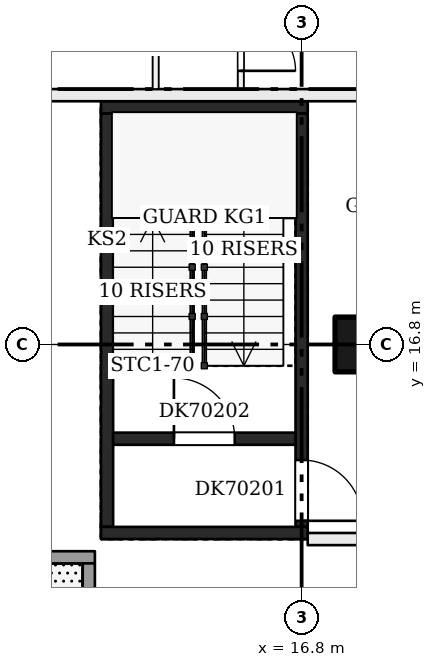
"""IFC4 building model, lengths in metres.
Left out: names, types, materials, properties, quantities, classifications, styles, units other than length and angle.
Written with IfcOpenShell. Run it as: python <this file> out.ifc"""

import sys

from ifc_helpers import new_model, si_unit, direction, frame, frame_2d, origin, origin_2d, place, context, subcontext, project, spatial, rectangle, extrude, element, fill, save


model = new_model("IFC4")
c1 = context("Model", 3, precision=1e-05, world=origin(), true_north=direction((0.0, 1.0)))
c2 = subcontext(c1, "Body", "Model", "MODEL_VIEW")
j1 = project(units=[si_unit("LENGTHUNIT", "METRE"), si_unit("PLANEANGLEUNIT", "RADIAN")], contexts=[c1])
p1 = place(None, origin())
s1 = spatial("IfcSite", under=j1, at=p1, CompositionType="ELEMENT")
p2 = place(p1, origin())
s2 = spatial("IfcBuilding", under=s1, at=p2, CompositionType="ELEMENT")
p3 = place(p2, frame((0.0, 0.0, 266.7)))
s3 = spatial("IfcBuildingStorey", under=s2, at=p3, CompositionType="ELEMENT", Elevation=266.7)
p4 = place(p3, frame((17.8, 16.8, 0.0), z_axis=(0.0, 0.0, 1.0), x_axis=(1.0, 0.0, 0.0)))
e1 = element("IfcColumn", 1, at=p4, inside=s3, PredefinedType="COLUMN", context=c2, shape_type="SweptSolid", body=[
    extrude(rectangle(XDim=0.9, YDim=0.9, at=origin_2d()), origin(), (0.0, 0.0, 1.0), 3.22),
])
p5 = place(p3, frame((13.6, 13.8, 0.0), z_axis=(0.0, 0.0, 1.0), x_axis=(0.0, 1.0, 0.0)))
e2 = element("IfcWall", 2, at=p5, inside=s3, PredefinedType="SHEAR", context=c2, shape_type="SweptSolid", body=[
    extrude(rectangle(XDim=6.8, YDim=0.2, at=frame_2d((3.4, 0.0))), origin(), (0.0, 0.0, 1.0), 3.22),
])
p6 = place(p3, frame((16.8, 13.8, 0.0), z_axis=(0.0, 0.0, 1.0), x_axis=(0.0, 1.0, 0.0)))
e3 = element("IfcWall", 3, at=p6, inside=s3, PredefinedType="SHEAR", context=c2, shape_type="SweptSolid", body=[
    extrude(rectangle(XDim=6.8, YDim=0.2, at=frame_2d((3.4, 0.0))), origin(), (0.0, 0.0, 1.0), 3.22),
])
p7 = place(p6, frame((0.1, 0.0, 0.0)))
e4 = element("IfcOpeningElement", 4, at=p7, cuts=e3, PredefinedType="OPENING", context=c2, shape_type="SweptSolid", body=[
    extrude(rectangle(XDim=1.0, YDim=2.1, at=frame_2d((0.5, 1.05))), frame((0.0, 0.11, 0.0), z_axis=(0.0, -1.0, 0.0), x_axis=(1.0, 0.0, 0.0)), (0.0, 0.0, 1.0), 0.22),
])
for number, where, z_axis, x_axis in (
    (5, (13.5, 13.7, 0.0), (0.0, 0.0, 1.0), (1.0, 0.0, 0.0)),
    (6, (13.5, 20.7, 0.0), (0.0, 0.0, 1.0), (1.0, 0.0, 0.0)),
):
    element("IfcWall", number, at=place(p3, frame(where, z_axis=z_axis, x_axis=x_axis)), inside=s3, PredefinedType="SHEAR", context=c2, shape_type="SweptSolid", body=[
        extrude(rectangle(XDim=3.4, YDim=0.2, at=frame_2d((1.7, 0.0))), origin(), (0.0, 0.0, 1.0), 3.22),
    ])
p8 = place(p3, frame((13.7, 15.25, 0.0), z_axis=(0.0, 0.0, 1.0), x_axis=(1.0, 0.0, 0.0)))
e7 = element("IfcWall", 7, at=p8, inside=s3, PredefinedType="SHEAR", context=c2, shape_type="SweptSolid", body=[
    extrude(rectangle(XDim=3.0, YDim=0.2, at=frame_2d((1.5, 0.0))), origin(), (0.0, 0.0, 1.0), 3.22),
])
p9 = place(p8, frame((1.0, 0.0, 0.0)))
e8 = element("IfcOpeningElement", 8, at=p9, cuts=e7, PredefinedType="OPENING", context=c2, shape_type="SweptSolid", body=[
    extrude(rectangle(XDim=1.0, YDim=2.1, at=frame_2d((0.5, 1.05))), frame((0.0, 0.11, 0.0), z_axis=(0.0, -1.0, 0.0), x_axis=(1.0, 0.0, 0.0)), (0.0, 0.0, 1.0), 0.22),
])
p10 = place(p3, frame((16.9, 13.6, 0.0), z_axis=(0.0, 0.0, 1.0), x_axis=(1.0, 0.0, 0.0)))
e9 = element("IfcWall", 9, at=p10, inside=s3, PredefinedType="PARTITIONING", context=c2, shape_type="SweptSolid", body=[
    extrude(rectangle(XDim=4.2, YDim=0.2, at=frame_2d((2.1, 0.0))), origin(), (0.0, 0.0, 1.0), 3.22),
])
p11 = place(p10, frame((1.6, 0.0, 0.0)))
e10 = element("IfcOpeningElement", 10, at=p11, cuts=e9, PredefinedType="OPENING", context=c2, shape_type="SweptSolid", body=[
    extrude(rectangle(XDim=1.0, YDim=2.1, at=frame_2d((0.5, 1.05))), frame((0.0, 0.11, 0.0), z_axis=(0.0, -1.0, 0.0), x_axis=(1.0, 0.0, 0.0)), (0.0, 0.0, 1.0), 0.22),
])
p12 = place(p3, frame((10.9, 20.9, 0.0), z_axis=(0.0, 0.0, 1.0), x_axis=(1.0, 0.0, 0.0)))
e11 = element("IfcWall", 11, at=p12, inside=s3, PredefinedType="PARTITIONING", context=c2, shape_type="SweptSolid", body=[
    extrude(rectangle(XDim=8.3, YDim=0.2, at=frame_2d((4.15, 0.0))), origin(), (0.0, 0.0, 1.0), 3.22),
])
p13 = place(p3, frame((14.4, 21.0, 0.0), z_axis=(0.0, 0.0, 1.0), x_axis=(0.0, 1.0, 0.0)))
e12 = element("IfcWall", 12, at=p13, inside=s3, PredefinedType="PARTITIONING", context=c2, shape_type="SweptSolid", body=[
    extrude(rectangle(XDim=19.0, YDim=0.1, at=frame_2d((9.5, 0.0))), origin(), (0.0, 0.0, 1.0), 3.22),
])
p14 = place(p13, frame((1.6, 0.0, 0.0)))
e13 = element("IfcOpeningElement", 13, at=p14, cuts=e12, PredefinedType="OPENING", context=c2, shape_type="SweptSolid", body=[
    extrude(rectangle(XDim=0.9, YDim=2.1, at=frame_2d((0.45, 1.05))), frame((0.0, 0.06, 0.0), z_axis=(0.0, -1.0, 0.0), x_axis=(1.0, 0.0, 0.0)), (0.0, 0.0, 1.0), 0.12),
])
p15 = place(p13, frame((5.8, 0.0, 0.0)))
e14 = element("IfcOpeningElement", 14, at=p15, cuts=e12, PredefinedType="OPENING", context=c2, shape_type="SweptSolid", body=[
    extrude(rectangle(XDim=0.9, YDim=2.1, at=frame_2d((0.45, 1.05))), frame((0.0, 0.06, 0.0), z_axis=(0.0, -1.0, 0.0), x_axis=(1.0, 0.0, 0.0)), (0.0, 0.0, 1.0), 0.12),
])
p16 = place(p13, frame((10.0, 0.0, 0.0)))
e15 = element("IfcOpeningElement", 15, at=p16, cuts=e12, PredefinedType="OPENING", context=c2, shape_type="SweptSolid", body=[
    extrude(rectangle(XDim=0.9, YDim=2.1, at=frame_2d((0.45, 1.05))), frame((0.0, 0.06, 0.0), z_axis=(0.0, -1.0, 0.0), x_axis=(1.0, 0.0, 0.0)), (0.0, 0.0, 1.0), 0.12),
])
p17 = place(p13, frame((15.4, 0.0, 0.0)))
e16 = element("IfcOpeningElement", 16, at=p17, cuts=e12, PredefinedType="OPENING", context=c2, shape_type="SweptSolid", body=[
    extrude(rectangle(XDim=0.9, YDim=2.1, at=frame_2d((0.45, 1.05))), frame((0.0, 0.06, 0.0), z_axis=(0.0, -1.0, 0.0), x_axis=(1.0, 0.0, 0.0)), (0.0, 0.0, 1.0), 0.12),
])
p18 = place(p3, frame((15.8, 21.0, 0.0), z_axis=(0.0, 0.0, 1.0), x_axis=(0.0, 1.0, 0.0)))
e17 = element("IfcWall", 17, at=p18, inside=s3, PredefinedType="PARTITIONING", context=c2, shape_type="SweptSolid", body=[
    extrude(rectangle(XDim=19.0, YDim=0.1, at=frame_2d((9.5, 0.0))), origin(), (0.0, 0.0, 1.0), 3.22),
])
p19 = place(p18, frame((2.6, 0.0, 0.0)))
e18 = element("IfcOpeningElement", 18, at=p19, cuts=e17, PredefinedType="OPENING", context=c2, shape_type="SweptSolid", body=[
    extrude(rectangle(XDim=0.9, YDim=2.1, at=frame_2d((0.45, 1.05))), frame((0.0, 0.06, 0.0), z_axis=(0.0, -1.0, 0.0), x_axis=(1.0, 0.0, 0.0)), (0.0, 0.0, 1.0), 0.12),
])
p20 = place(p18, frame((0.3, 0.0, 0.0)))
e19 = element("IfcOpeningElement", 19, at=p20, cuts=e17, PredefinedType="OPENING", context=c2, shape_type="SweptSolid", body=[
    extrude(rectangle(XDim=0.9, YDim=2.1, at=frame_2d((0.45, 1.05))), frame((0.0, 0.06, 0.0), z_axis=(0.0, -1.0, 0.0), x_axis=(1.0, 0.0, 0.0)), (0.0, 0.0, 1.0), 0.12),
])
p21 = place(p18, frame((5.433, 0.0, 0.0)))
e20 = element("IfcOpeningElement", 20, at=p21, cuts=e17, PredefinedType="OPENING", context=c2, shape_type="SweptSolid", body=[
    extrude(rectangle(XDim=0.9, YDim=2.1, at=frame_2d((0.45, 1.05))), frame((0.0, 0.06, 0.0), z_axis=(0.0, -1.0, 0.0), x_axis=(1.0, 0.0, 0.0)), (0.0, 0.0, 1.0), 0.12),
])
p22 = place(p18, frame((8.067, 0.0, 0.0)))
e21 = element("IfcOpeningElement", 21, at=p22, cuts=e17, PredefinedType="OPENING", context=c2, shape_type="SweptSolid", body=[
    extrude(rectangle(XDim=0.9, YDim=2.1, at=frame_2d((0.45, 1.05))), frame((0.0, 0.06, 0.0), z_axis=(0.0, -1.0, 0.0), x_axis=(1.0, 0.0, 0.0)), (0.0, 0.0, 1.0), 0.12),
])
p23 = place(p18, frame((10.7, 0.0, 0.0)))
e22 = element("IfcOpeningElement", 22, at=p23, cuts=e17, PredefinedType="OPENING", context=c2, shape_type="SweptSolid", body=[
    extrude(rectangle(XDim=0.9, YDim=2.1, at=frame_2d((0.45, 1.05))), frame((0.0, 0.06, 0.0), z_axis=(0.0, -1.0, 0.0), x_axis=(1.0, 0.0, 0.0)), (0.0, 0.0, 1.0), 0.12),
])
p24 = place(p18, frame((13.633, 0.0, 0.0)))
e23 = element("IfcOpeningElement", 23, at=p24, cuts=e17, PredefinedType="OPENING", context=c2, shape_type="SweptSolid", body=[
    extrude(rectangle(XDim=0.9, YDim=2.1, at=frame_2d((0.45, 1.05))), frame((0.0, 0.06, 0.0), z_axis=(0.0, -1.0, 0.0), x_axis=(1.0, 0.0, 0.0)), (0.0, 0.0, 1.0), 0.12),
])
p25 = place(p18, frame((16.867, 0.0, 0.0)))
e24 = element("IfcOpeningElement", 24, at=p25, cuts=e17, PredefinedType="OPENING", context=c2, shape_type="SweptSolid", body=[
    extrude(rectangle(XDim=0.9, YDim=2.1, at=frame_2d((0.45, 1.05))), frame((0.0, 0.06, 0.0), z_axis=(0.0, -1.0, 0.0), x_axis=(1.0, 0.0, 0.0)), (0.0, 0.0, 1.0), 0.12),
])
p26 = place(p3, frame((10.8, 13.3, 0.0), z_axis=(0.0, 0.0, 1.0), x_axis=(1.0, 0.0, 0.0)))
e25 = element("IfcWall", 25, at=p26, inside=s3, PredefinedType="SOLIDWALL", context=c2, shape_type="SweptSolid", body=[
    extrude(rectangle(XDim=2.6, YDim=0.2, at=frame_2d((1.3, 0.0))), origin(), (0.0, 0.0, 1.0), 3.22),
])
p27 = place(p3, frame((13.3, 13.2, 0.0), z_axis=(0.0, 0.0, 1.0), x_axis=(0.0, -1.0, 0.0)))
e26 = element("IfcWall", 26, at=p27, inside=s3, PredefinedType="SOLIDWALL", context=c2, shape_type="SweptSolid", body=[
    extrude(rectangle(XDim=2.2, YDim=0.2, at=frame_2d((1.1, 0.0))), origin(), (0.0, 0.0, 1.0), 3.22),
])
p28 = place(p7, frame((1.0, 0.0, 0.0), z_axis=(0.0, 0.0, 1.0), x_axis=(-1.0, 0.0, 0.0)))
e27 = element("IfcDoor", 27, at=p28, inside=s3, OperationType="SINGLE_SWING_RIGHT", PredefinedType="DOOR", context=c2, shape_type="SweptSolid", body=[
    extrude(rectangle(XDim=1.0, YDim=2.1, at=frame_2d((0.5, 1.05))), frame((0.0, 0.025, 0.0), z_axis=(0.0, -1.0, 0.0), x_axis=(1.0, 0.0, 0.0)), (0.0, 0.0, 1.0), 0.05),
])
fill(e4, e27)
p29 = place(p9, origin())
e28 = element("IfcDoor", 28, at=p29, inside=s3, OperationType="SINGLE_SWING_LEFT", PredefinedType="DOOR", context=c2, shape_type="SweptSolid", body=[
    extrude(rectangle(XDim=1.0, YDim=2.1, at=frame_2d((0.5, 1.05))), frame((0.0, 0.025, 0.0), z_axis=(0.0, -1.0, 0.0), x_axis=(1.0, 0.0, 0.0)), (0.0, 0.0, 1.0), 0.05),
])
fill(e8, e28)
p30 = place(p20, frame((0.9, 0.0, 0.0), z_axis=(0.0, 0.0, 1.0), x_axis=(-1.0, 0.0, 0.0)))
e29 = element("IfcDoor", 29, at=p30, inside=s3, OperationType="SINGLE_SWING_RIGHT", PredefinedType="DOOR", context=c2, shape_type="SweptSolid", body=[
    extrude(rectangle(XDim=0.9, YDim=2.1, at=frame_2d((0.45, 1.05))), frame((0.0, 0.025, 0.0), z_axis=(0.0, -1.0, 0.0), x_axis=(1.0, 0.0, 0.0)), (0.0, 0.0, 1.0), 0.05),
])
fill(e19, e29)
save(model, sys.argv[1])
